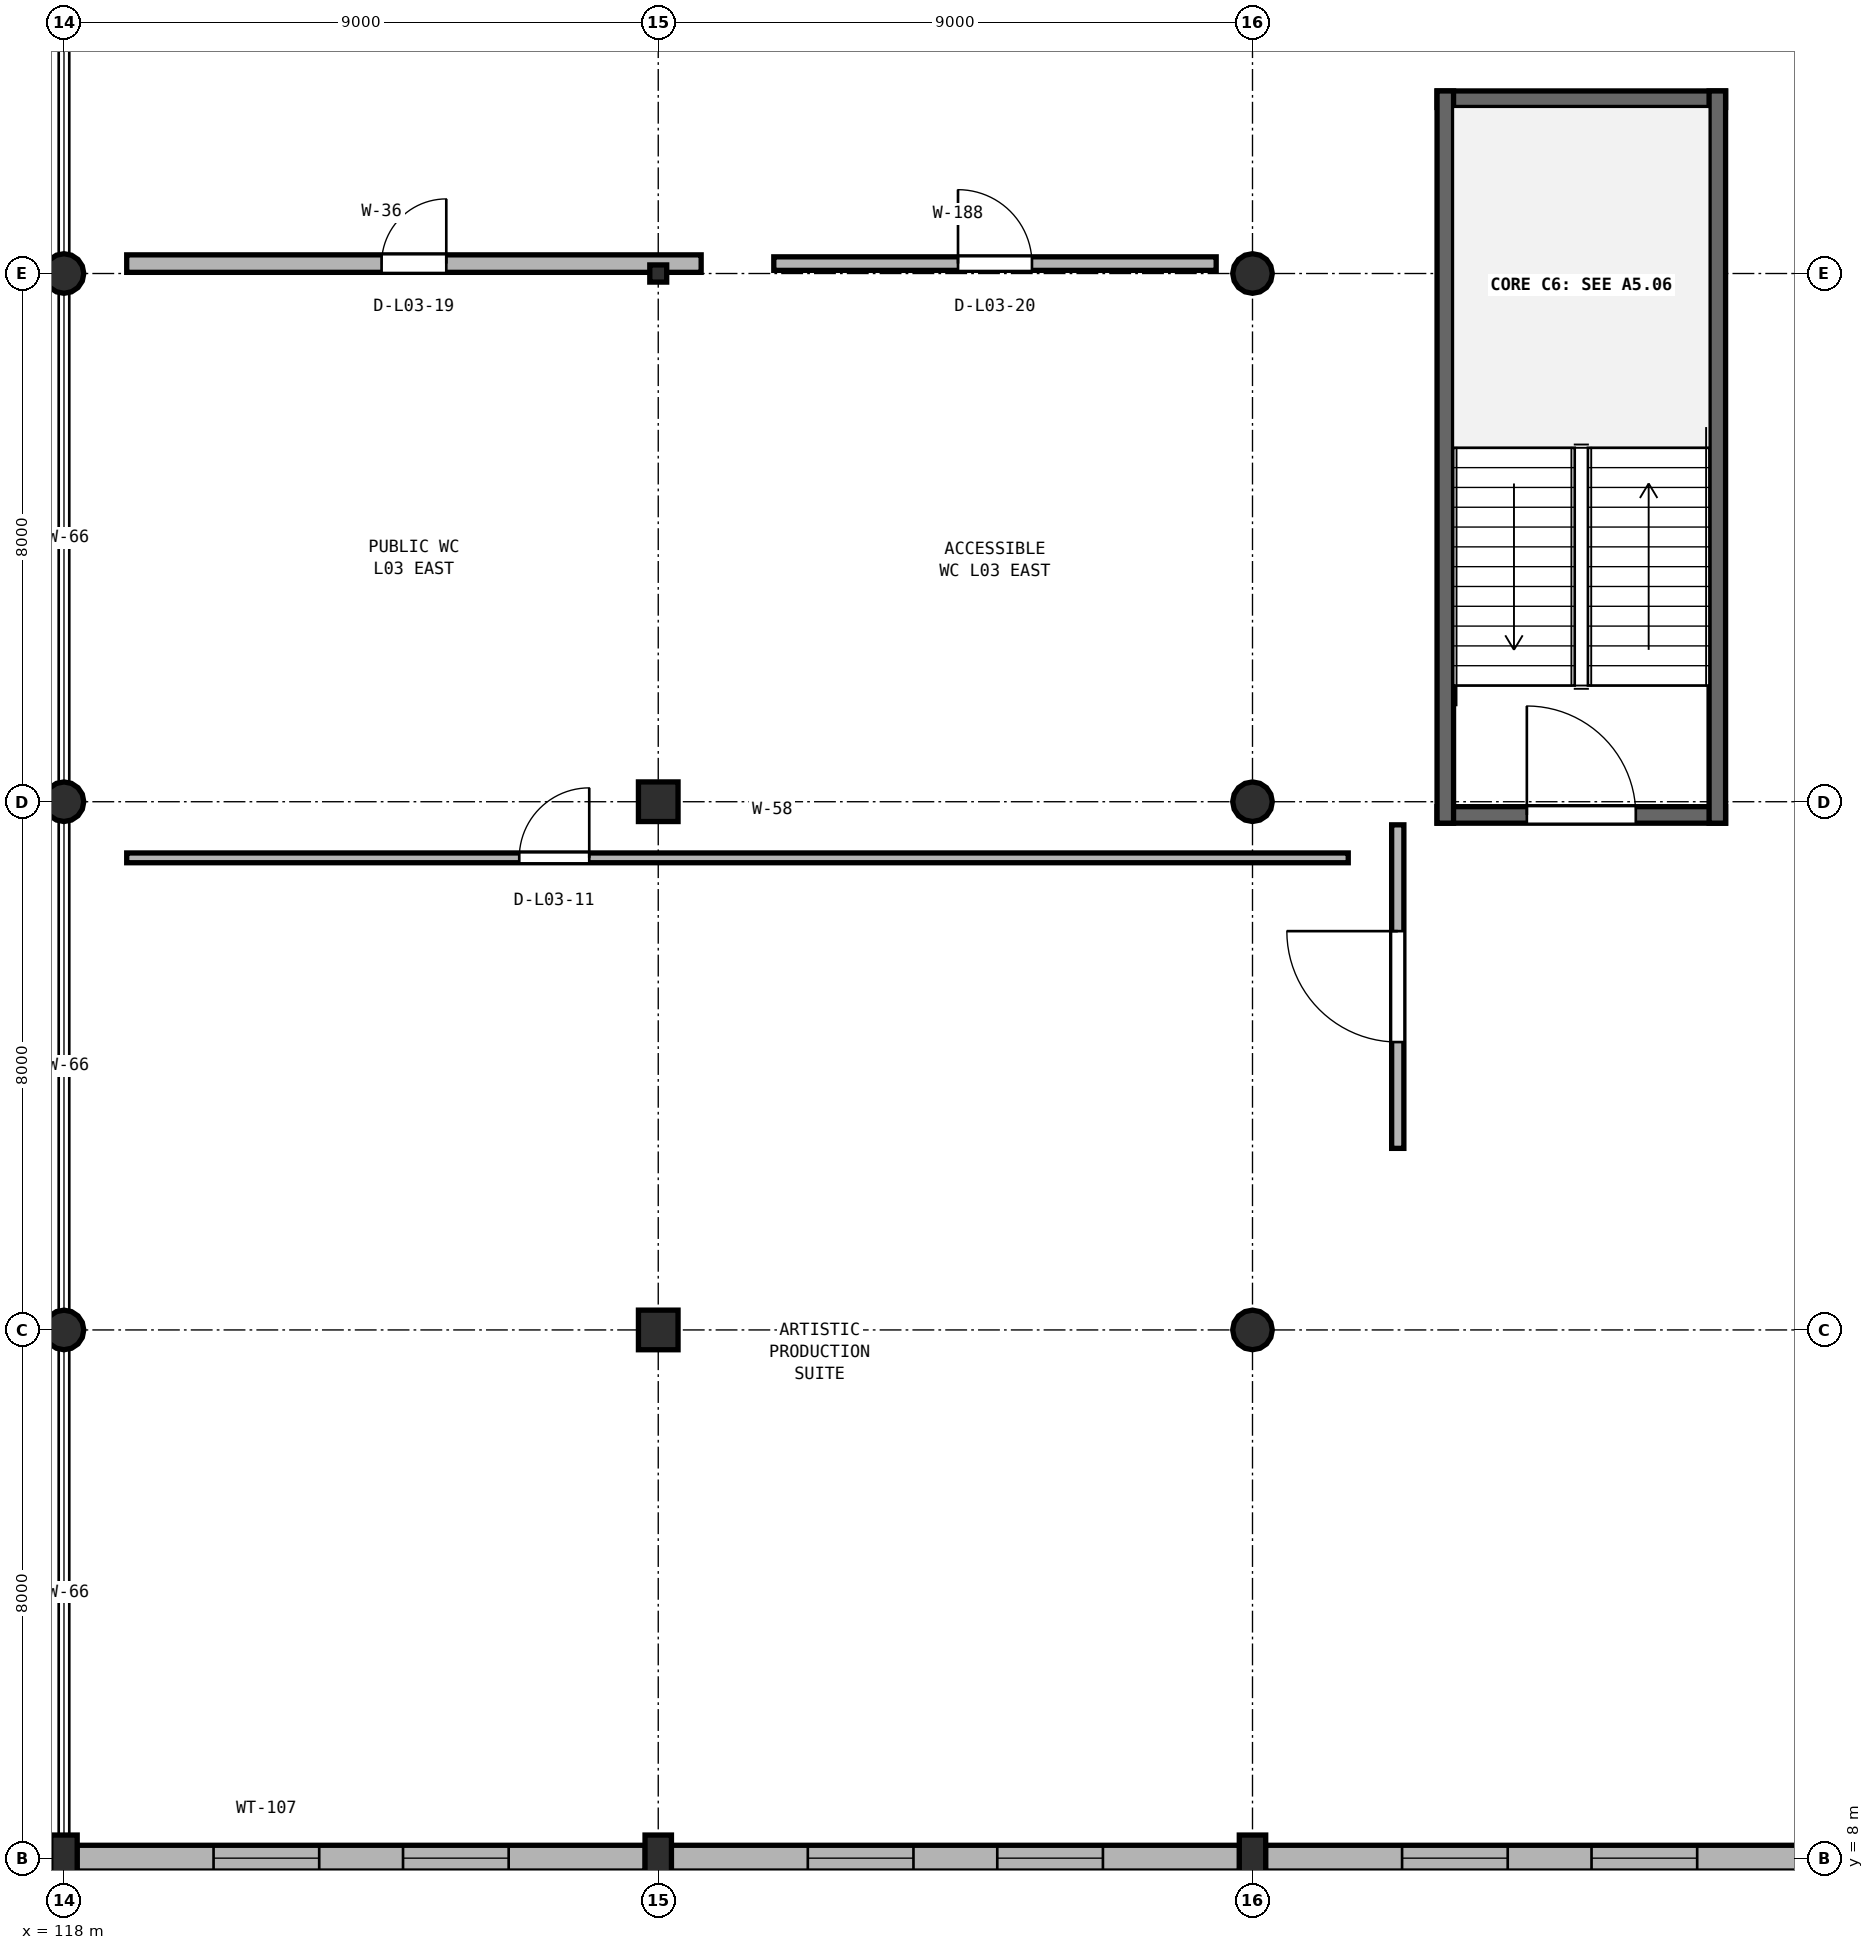
"""IFC4 building model, lengths in metres.
Left out: names, types, materials, properties, quantities, classifications, styles, units other than length and angle.
Written with IfcOpenShell. Run it as: python <this file> out.ifc"""

import sys

from ifc_helpers import new_model, si_unit, direction, frame, frame_2d, origin, origin_2d, place, context, subcontext, project, spatial, rectangle, circle, i_section, extrude, element, fill, save


model = new_model("IFC4")
c1 = context("Model", 3, precision=1e-05, world=origin(), true_north=direction((0.0, 1.0)))
c2 = subcontext(c1, "Body", "Model", "MODEL_VIEW")
j1 = project(units=[si_unit("LENGTHUNIT", "METRE"), si_unit("PLANEANGLEUNIT", "RADIAN")], contexts=[c1])
p1 = place(None, origin())
s1 = spatial("IfcSite", under=j1, at=p1, CompositionType="ELEMENT")
p2 = place(p1, origin())
s2 = spatial("IfcBuilding", under=s1, at=p2, CompositionType="ELEMENT")
p3 = place(p2, frame((0.0, 0.0, 14.7)))
s3 = spatial("IfcBuildingStorey", under=s2, at=p3, CompositionType="ELEMENT", Elevation=14.7)
p4 = place(p3, frame((118.0, 8.0, 0.0), z_axis=(0.0, 0.0, 1.0), x_axis=(1.0, 0.0, 0.0)))
e1 = element("IfcColumn", 1, at=p4, inside=s3, PredefinedType="PILASTER", context=c2, shape_type="SweptSolid", body=[
    extrude(rectangle(XDim=0.4, YDim=0.7, at=origin_2d()), origin(), (0.0, 0.0, 1.0), 4.25),
])
for number, where, z_axis, x_axis in (
    (2, (118.0, 16.0, 0.0), (0.0, 0.0, 1.0), (1.0, 0.0, 0.0)),
    (3, (118.0, 24.0, 0.0), (0.0, 0.0, 1.0), (1.0, 0.0, 0.0)),
    (4, (118.0, 32.0, 0.0), (0.0, 0.0, 1.0), (1.0, 0.0, 0.0)),
):
    element("IfcColumn", number, at=place(p3, frame(where, z_axis=z_axis, x_axis=x_axis)), inside=s3, PredefinedType="COLUMN", context=c2, shape_type="SweptSolid", body=[
        extrude(circle(Radius=0.3, at=origin_2d()), origin(), (0.0, 0.0, 1.0), 4.25),
    ])
p5 = place(p3, frame((127.0, 8.0, 0.0), z_axis=(0.0, 0.0, 1.0), x_axis=(1.0, 0.0, 0.0)))
e5 = element("IfcColumn", 5, at=p5, inside=s3, PredefinedType="PILASTER", context=c2, shape_type="SweptSolid", body=[
    extrude(rectangle(XDim=0.4, YDim=0.7, at=origin_2d()), origin(), (0.0, 0.0, 1.0), 4.25),
])
for number, where, z_axis, x_axis in (
    (6, (127.0, 16.0, 0.0), (0.0, 0.0, 1.0), (1.0, 0.0, 0.0)),
    (7, (127.0, 24.0, 0.0), (0.0, 0.0, 1.0), (1.0, 0.0, 0.0)),
):
    element("IfcColumn", number, at=place(p3, frame(where, z_axis=z_axis, x_axis=x_axis)), inside=s3, PredefinedType="COLUMN", context=c2, shape_type="SweptSolid", body=[
        extrude(rectangle(XDim=0.6, YDim=0.6, at=origin_2d()), origin(), (0.0, 0.0, 1.0), 4.25),
    ])
p6 = place(p3, frame((127.0, 32.0, 0.0), z_axis=(0.0, 0.0, 1.0), x_axis=(1.0, 0.0, 0.0)))
e8 = element("IfcColumn", 8, at=p6, inside=s3, PredefinedType="COLUMN", context=c2, shape_type="SweptSolid", body=[
    extrude(i_section(OverallWidth=0.256, OverallDepth=0.26, WebThickness=0.01, FlangeThickness=0.017, FilletRadius=0.014, at=origin_2d()), origin(), (0.0, 0.0, 1.0), 4.25),
])
p7 = place(p3, frame((136.0, 8.0, 0.0), z_axis=(0.0, 0.0, 1.0), x_axis=(1.0, 0.0, 0.0)))
e9 = element("IfcColumn", 9, at=p7, inside=s3, PredefinedType="PILASTER", context=c2, shape_type="SweptSolid", body=[
    extrude(rectangle(XDim=0.4, YDim=0.7, at=origin_2d()), origin(), (0.0, 0.0, 1.0), 4.25),
])
for number, where, z_axis, x_axis in (
    (10, (136.0, 16.0, 0.0), (0.0, 0.0, 1.0), (1.0, 0.0, 0.0)),
    (11, (136.0, 24.0, 0.0), (0.0, 0.0, 1.0), (1.0, 0.0, 0.0)),
    (12, (136.0, 32.0, 0.0), (0.0, 0.0, 1.0), (1.0, 0.0, 0.0)),
):
    element("IfcColumn", number, at=place(p3, frame(where, z_axis=z_axis, x_axis=x_axis)), inside=s3, PredefinedType="COLUMN", context=c2, shape_type="SweptSolid", body=[
        extrude(circle(Radius=0.3, at=origin_2d()), origin(), (0.0, 0.0, 1.0), 4.25),
    ])
p8 = place(p3, frame((118.196, 8.0, 0.0), z_axis=(0.0, 0.0, 1.0), x_axis=(1.0, 0.0, 0.0)))
e13 = element("IfcWall", 13, at=p8, inside=s3, PredefinedType="SOLIDWALL", context=c2, shape_type="SweptSolid", body=[
    extrude(rectangle(XDim=8.608, YDim=0.39, at=frame_2d((4.304, 0.0))), origin(), (0.0, 0.0, 1.0), 3.842),
])
p9 = place(p8, frame((2.069, 0.0, 0.75)))
e14 = element("IfcOpeningElement", 14, at=p9, cuts=e13, PredefinedType="OPENING", context=c2, shape_type="SweptSolid", body=[
    extrude(rectangle(XDim=1.6, YDim=1.7, at=frame_2d((0.8, 0.85))), frame((0.0, 0.205, 0.0), z_axis=(0.0, -1.0, 0.0), x_axis=(1.0, 0.0, 0.0)), (0.0, 0.0, 1.0), 0.41),
])
p10 = place(p8, frame((4.939, 0.0, 0.75)))
e15 = element("IfcOpeningElement", 15, at=p10, cuts=e13, PredefinedType="OPENING", context=c2, shape_type="SweptSolid", body=[
    extrude(rectangle(XDim=1.6, YDim=1.7, at=frame_2d((0.8, 0.85))), frame((0.0, 0.205, 0.0), z_axis=(0.0, -1.0, 0.0), x_axis=(1.0, 0.0, 0.0)), (0.0, 0.0, 1.0), 0.41),
])
p11 = place(p3, frame((127.196, 8.0, 0.0), z_axis=(0.0, 0.0, 1.0), x_axis=(1.0, 0.0, 0.0)))
e16 = element("IfcWall", 16, at=p11, inside=s3, PredefinedType="SOLIDWALL", context=c2, shape_type="SweptSolid", body=[
    extrude(rectangle(XDim=8.608, YDim=0.39, at=frame_2d((4.304, 0.0))), origin(), (0.0, 0.0, 1.0), 3.842),
])
p12 = place(p11, frame((2.069, 0.0, 0.75)))
e17 = element("IfcOpeningElement", 17, at=p12, cuts=e16, PredefinedType="OPENING", context=c2, shape_type="SweptSolid", body=[
    extrude(rectangle(XDim=1.6, YDim=1.7, at=frame_2d((0.8, 0.85))), frame((0.0, 0.205, 0.0), z_axis=(0.0, -1.0, 0.0), x_axis=(1.0, 0.0, 0.0)), (0.0, 0.0, 1.0), 0.41),
])
p13 = place(p11, frame((4.939, 0.0, 0.75)))
e18 = element("IfcOpeningElement", 18, at=p13, cuts=e16, PredefinedType="OPENING", context=c2, shape_type="SweptSolid", body=[
    extrude(rectangle(XDim=1.6, YDim=1.7, at=frame_2d((0.8, 0.85))), frame((0.0, 0.205, 0.0), z_axis=(0.0, -1.0, 0.0), x_axis=(1.0, 0.0, 0.0)), (0.0, 0.0, 1.0), 0.41),
])
p14 = place(p3, frame((136.196, 8.0, 0.0), z_axis=(0.0, 0.0, 1.0), x_axis=(1.0, 0.0, 0.0)))
e19 = element("IfcWall", 19, at=p14, inside=s3, PredefinedType="SOLIDWALL", context=c2, shape_type="SweptSolid", body=[
    extrude(rectangle(XDim=8.608, YDim=0.39, at=frame_2d((4.304, 0.0))), origin(), (0.0, 0.0, 1.0), 3.842),
])
p15 = place(p14, frame((2.069, 0.0, 0.75)))
e20 = element("IfcOpeningElement", 20, at=p15, cuts=e19, PredefinedType="OPENING", context=c2, shape_type="SweptSolid", body=[
    extrude(rectangle(XDim=1.6, YDim=1.7, at=frame_2d((0.8, 0.85))), frame((0.0, 0.205, 0.0), z_axis=(0.0, -1.0, 0.0), x_axis=(1.0, 0.0, 0.0)), (0.0, 0.0, 1.0), 0.41),
])
p16 = place(p14, frame((4.939, 0.0, 0.75)))
e21 = element("IfcOpeningElement", 21, at=p16, cuts=e19, PredefinedType="OPENING", context=c2, shape_type="SweptSolid", body=[
    extrude(rectangle(XDim=1.6, YDim=1.7, at=frame_2d((0.8, 0.85))), frame((0.0, 0.205, 0.0), z_axis=(0.0, -1.0, 0.0), x_axis=(1.0, 0.0, 0.0)), (0.0, 0.0, 1.0), 0.41),
])
p17 = place(p3, frame((138.795, 23.8, 0.0), z_axis=(0.0, 0.0, 1.0), x_axis=(1.0, 0.0, 0.0)))
e22 = element("IfcWall", 22, at=p17, inside=s3, PredefinedType="SHEAR", context=c2, shape_type="SweptSolid", body=[
    extrude(rectangle(XDim=4.37, YDim=0.25, at=frame_2d((2.185, 0.0))), origin(), (0.0, 0.0, 1.0), 4.25),
])
p18 = place(p17, frame((1.36, 0.0, 0.0)))
e23 = element("IfcOpeningElement", 23, at=p18, cuts=e22, PredefinedType="OPENING", context=c2, shape_type="SweptSolid", body=[
    extrude(rectangle(XDim=1.65, YDim=2.22, at=frame_2d((0.825, 1.11))), frame((0.0, 0.135, 0.0), z_axis=(0.0, -1.0, 0.0), x_axis=(1.0, 0.0, 0.0)), (0.0, 0.0, 1.0), 0.27),
])
p19 = place(p3, frame((138.795, 34.64, 0.0), z_axis=(0.0, 0.0, 1.0), x_axis=(1.0, 0.0, 0.0)))
e24 = element("IfcWall", 24, at=p19, inside=s3, PredefinedType="SHEAR", context=c2, shape_type="SweptSolid", body=[
    extrude(rectangle(XDim=4.37, YDim=0.25, at=frame_2d((2.185, 0.0))), origin(), (0.0, 0.0, 1.0), 4.25),
])
for number, where, z_axis, x_axis in (
    (25, (138.92, 23.675, 0.0), (0.0, 0.0, 1.0), (0.0, 1.0, 0.0)),
    (26, (143.04, 23.675, 0.0), (0.0, 0.0, 1.0), (0.0, 1.0, 0.0)),
):
    element("IfcWall", number, at=place(p3, frame(where, z_axis=z_axis, x_axis=x_axis)), inside=s3, PredefinedType="SHEAR", context=c2, shape_type="SweptSolid", body=[
        extrude(rectangle(XDim=11.09, YDim=0.25, at=frame_2d((5.545, 0.0))), origin(), (0.0, 0.0, 1.0), 4.25),
    ])
p20 = place(p3, frame((138.2, 18.75, 0.0), z_axis=(0.0, 0.0, 1.0), x_axis=(0.0, 1.0, 0.0)))
e27 = element("IfcWall", 27, at=p20, inside=s3, PredefinedType="PARTITIONING", context=c2, shape_type="SweptSolid", body=[
    extrude(rectangle(XDim=4.9, YDim=0.185, at=frame_2d((2.45, 0.0))), origin(), (0.0, 0.0, 1.0), 4.2),
])
p21 = place(p20, frame((1.61, 0.0, 0.0)))
e28 = element("IfcOpeningElement", 28, at=p21, cuts=e27, PredefinedType="OPENING", context=c2, shape_type="SweptSolid", body=[
    extrude(rectangle(XDim=1.68, YDim=2.25, at=frame_2d((0.84, 1.125))), frame((0.0, 0.103, 0.0), z_axis=(0.0, -1.0, 0.0), x_axis=(1.0, 0.0, 0.0)), (0.0, 0.0, 1.0), 0.205),
])
p22 = place(p3, frame((118.95, 23.15, 0.0), z_axis=(0.0, 0.0, 1.0), x_axis=(1.0, 0.0, 0.0)))
e29 = element("IfcWall", 29, at=p22, inside=s3, PredefinedType="PARTITIONING", context=c2, shape_type="SweptSolid", body=[
    extrude(rectangle(XDim=18.5, YDim=0.148, at=frame_2d((9.25, 0.0))), origin(), (0.0, 0.0, 1.0), 4.2),
])
p23 = place(p22, frame((5.945, 0.0, 0.0)))
e30 = element("IfcOpeningElement", 30, at=p23, cuts=e29, PredefinedType="OPENING", context=c2, shape_type="SweptSolid", body=[
    extrude(rectangle(XDim=1.06, YDim=2.2, at=frame_2d((0.53, 1.1))), frame((0.0, 0.084, 0.0), z_axis=(0.0, -1.0, 0.0), x_axis=(1.0, 0.0, 0.0)), (0.0, 0.0, 1.0), 0.168),
])
p24 = place(p3, frame((118.95, 32.15, 0.0), z_axis=(0.0, 0.0, 1.0), x_axis=(1.0, 0.0, 0.0)))
e31 = element("IfcWall", 31, at=p24, inside=s3, PredefinedType="PLUMBINGWALL", context=c2, shape_type="SweptSolid", body=[
    extrude(rectangle(XDim=8.7, YDim=0.265, at=frame_2d((4.35, 0.0))), origin(), (0.0, 0.0, 1.0), 3.613),
])
p25 = place(p24, frame((3.86, 0.0, 0.0)))
e32 = element("IfcOpeningElement", 32, at=p25, cuts=e31, PredefinedType="OPENING", context=c2, shape_type="SweptSolid", body=[
    extrude(rectangle(XDim=0.98, YDim=2.14, at=frame_2d((0.49, 1.07))), frame((0.0, 0.142, 0.0), z_axis=(0.0, -1.0, 0.0), x_axis=(1.0, 0.0, 0.0)), (0.0, 0.0, 1.0), 0.285),
])
p26 = place(p3, frame((128.75, 32.15, 0.0), z_axis=(0.0, 0.0, 1.0), x_axis=(1.0, 0.0, 0.0)))
e33 = element("IfcWall", 33, at=p26, inside=s3, PredefinedType="PLUMBINGWALL", context=c2, shape_type="SweptSolid", body=[
    extrude(rectangle(XDim=6.7, YDim=0.205, at=frame_2d((3.35, 0.0))), origin(), (0.0, 0.0, 1.0), 3.613),
])
p27 = place(p26, frame((2.79, 0.0, 0.0)))
e34 = element("IfcOpeningElement", 34, at=p27, cuts=e33, PredefinedType="OPENING", context=c2, shape_type="SweptSolid", body=[
    extrude(rectangle(XDim=1.12, YDim=2.16, at=frame_2d((0.56, 1.08))), frame((0.0, 0.113, 0.0), z_axis=(0.0, -1.0, 0.0), x_axis=(1.0, 0.0, 0.0)), (0.0, 0.0, 1.0), 0.225),
])
p28 = place(p9, origin())
e35 = element("IfcWindow", 35, at=p28, inside=s3, PartitioningType="SINGLE_PANEL", PredefinedType="WINDOW", context=c2, shape_type="SweptSolid", body=[
    extrude(rectangle(XDim=1.6, YDim=1.7, at=frame_2d((0.8, 0.85))), frame((0.0, 0.03, 0.0), z_axis=(0.0, -1.0, 0.0), x_axis=(1.0, 0.0, 0.0)), (0.0, 0.0, 1.0), 0.06),
])
fill(e14, e35)
p29 = place(p10, origin())
e36 = element("IfcWindow", 36, at=p29, inside=s3, PartitioningType="SINGLE_PANEL", PredefinedType="WINDOW", context=c2, shape_type="SweptSolid", body=[
    extrude(rectangle(XDim=1.6, YDim=1.7, at=frame_2d((0.8, 0.85))), frame((0.0, 0.03, 0.0), z_axis=(0.0, -1.0, 0.0), x_axis=(1.0, 0.0, 0.0)), (0.0, 0.0, 1.0), 0.06),
])
fill(e15, e36)
p30 = place(p12, origin())
e37 = element("IfcWindow", 37, at=p30, inside=s3, PartitioningType="SINGLE_PANEL", PredefinedType="WINDOW", context=c2, shape_type="SweptSolid", body=[
    extrude(rectangle(XDim=1.6, YDim=1.7, at=frame_2d((0.8, 0.85))), frame((0.0, 0.03, 0.0), z_axis=(0.0, -1.0, 0.0), x_axis=(1.0, 0.0, 0.0)), (0.0, 0.0, 1.0), 0.06),
])
fill(e17, e37)
p31 = place(p13, origin())
e38 = element("IfcWindow", 38, at=p31, inside=s3, PartitioningType="SINGLE_PANEL", PredefinedType="WINDOW", context=c2, shape_type="SweptSolid", body=[
    extrude(rectangle(XDim=1.6, YDim=1.7, at=frame_2d((0.8, 0.85))), frame((0.0, 0.03, 0.0), z_axis=(0.0, -1.0, 0.0), x_axis=(1.0, 0.0, 0.0)), (0.0, 0.0, 1.0), 0.06),
])
fill(e18, e38)
p32 = place(p15, origin())
e39 = element("IfcWindow", 39, at=p32, inside=s3, PartitioningType="SINGLE_PANEL", PredefinedType="WINDOW", context=c2, shape_type="SweptSolid", body=[
    extrude(rectangle(XDim=1.6, YDim=1.7, at=frame_2d((0.8, 0.85))), frame((0.0, 0.03, 0.0), z_axis=(0.0, -1.0, 0.0), x_axis=(1.0, 0.0, 0.0)), (0.0, 0.0, 1.0), 0.06),
])
fill(e20, e39)
p33 = place(p16, origin())
e40 = element("IfcWindow", 40, at=p33, inside=s3, PartitioningType="SINGLE_PANEL", PredefinedType="WINDOW", context=c2, shape_type="SweptSolid", body=[
    extrude(rectangle(XDim=1.6, YDim=1.7, at=frame_2d((0.8, 0.85))), frame((0.0, 0.03, 0.0), z_axis=(0.0, -1.0, 0.0), x_axis=(1.0, 0.0, 0.0)), (0.0, 0.0, 1.0), 0.06),
])
fill(e21, e40)
p34 = place(p18, origin())
e41 = element("IfcDoor", 41, at=p34, inside=s3, OperationType="SINGLE_SWING_LEFT", PredefinedType="DOOR", context=c2, shape_type="SweptSolid", body=[
    extrude(rectangle(XDim=1.65, YDim=2.22, at=frame_2d((0.825, 1.11))), frame((0.0, 0.025, 0.0), z_axis=(0.0, -1.0, 0.0), x_axis=(1.0, 0.0, 0.0)), (0.0, 0.0, 1.0), 0.05),
])
fill(e23, e41)
p35 = place(p21, origin())
e42 = element("IfcDoor", 42, at=p35, inside=s3, OperationType="SINGLE_SWING_RIGHT", PredefinedType="DOOR", context=c2, shape_type="SweptSolid", body=[
    extrude(rectangle(XDim=1.68, YDim=2.25, at=frame_2d((0.84, 1.125))), frame((0.0, 0.025, 0.0), z_axis=(0.0, -1.0, 0.0), x_axis=(1.0, 0.0, 0.0)), (0.0, 0.0, 1.0), 0.05),
])
fill(e28, e42)
p36 = place(p23, origin())
e43 = element("IfcDoor", 43, at=p36, inside=s3, OperationType="SINGLE_SWING_RIGHT", PredefinedType="DOOR", context=c2, shape_type="SweptSolid", body=[
    extrude(rectangle(XDim=1.06, YDim=2.2, at=frame_2d((0.53, 1.1))), frame((0.0, 0.025, 0.0), z_axis=(0.0, -1.0, 0.0), x_axis=(1.0, 0.0, 0.0)), (0.0, 0.0, 1.0), 0.05),
])
fill(e30, e43)
p37 = place(p25, origin())
e44 = element("IfcDoor", 44, at=p37, inside=s3, OperationType="SINGLE_SWING_RIGHT", PredefinedType="DOOR", context=c2, shape_type="SweptSolid", body=[
    extrude(rectangle(XDim=0.98, YDim=2.14, at=frame_2d((0.49, 1.07))), frame((0.0, 0.025, 0.0), z_axis=(0.0, -1.0, 0.0), x_axis=(1.0, 0.0, 0.0)), (0.0, 0.0, 1.0), 0.05),
])
fill(e32, e44)
p38 = place(p27, origin())
e45 = element("IfcDoor", 45, at=p38, inside=s3, OperationType="SINGLE_SWING_LEFT", PredefinedType="DOOR", context=c2, shape_type="SweptSolid", body=[
    extrude(rectangle(XDim=1.12, YDim=2.16, at=frame_2d((0.56, 1.08))), frame((0.0, 0.025, 0.0), z_axis=(0.0, -1.0, 0.0), x_axis=(1.0, 0.0, 0.0)), (0.0, 0.0, 1.0), 0.05),
])
fill(e34, e45)
save(model, sys.argv[1])
